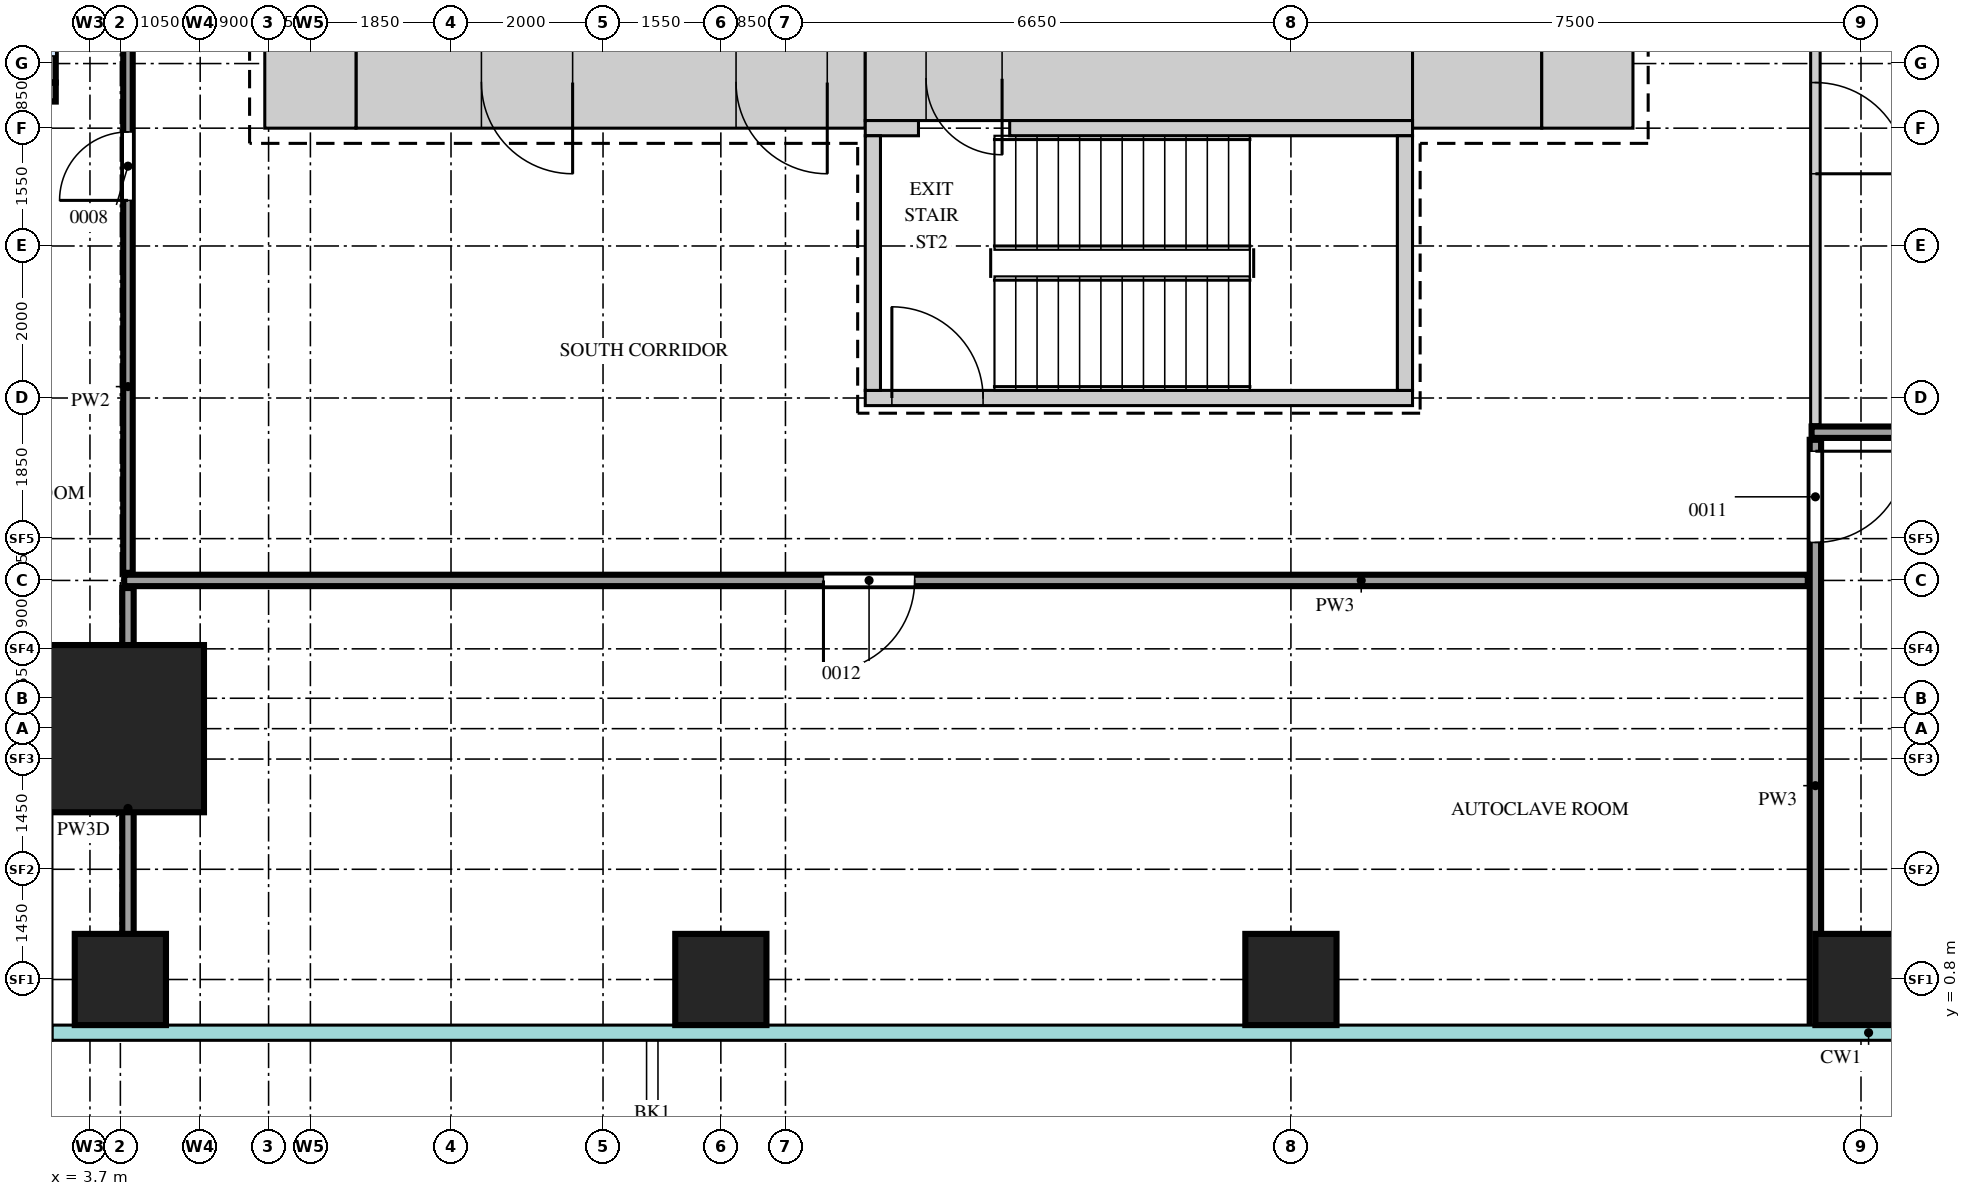
"""IFC4 building model, lengths in metres.
Left out: names, types, materials, properties, quantities, classifications, styles, units other than length and angle.
Written with IfcOpenShell. Run it as: python <this file> out.ifc"""

import sys

from ifc_helpers import new_model, si_unit, direction, frame, frame_2d, origin, origin_2d, place, context, subcontext, project, spatial, rectangle, extrude, source, transform, mapped, element, fill, save


model = new_model("IFC4")
c1 = context("Model", 3, precision=1e-05, world=origin(), true_north=direction((0.0, 1.0)))
c2 = subcontext(c1, "Body", "Model", "MODEL_VIEW")
j1 = project(units=[si_unit("LENGTHUNIT", "METRE"), si_unit("PLANEANGLEUNIT", "RADIAN")], contexts=[c1])
p1 = place(None, origin())
s1 = spatial("IfcSite", under=j1, at=p1, CompositionType="ELEMENT")
p2 = place(p1, origin())
s2 = spatial("IfcBuilding", under=s1, at=p2, CompositionType="ELEMENT")
p3 = place(p2, frame((0.0, 0.0, 55.5)))
s3 = spatial("IfcBuildingStorey", under=s2, at=p3, CompositionType="ELEMENT", Elevation=55.5)
m1 = source(origin(), c2, "Body", "SweptSolid", [
    extrude(rectangle(XDim=6.7, YDim=1.2, at=frame_2d((3.35, 0.0))), origin(), (0.0, 0.0, 1.0), 4.2),
])
p4 = place(p3, frame((7.2, 12.6, 0.0), z_axis=(0.0, 0.0, 1.0), x_axis=(1.0, 0.0, 0.0)))
e1 = element("IfcWall", 1, at=p4, inside=s3, PredefinedType="SHEAR", context=c2, shape_type="MappedRepresentation", body=[
    mapped(m1, transform((0.0, 0.0, 0.0))),
])
m2 = source(origin(), c2, "Body", "SweptSolid", [
    extrude(rectangle(XDim=1.2, YDim=2.1, at=frame_2d((0.6, 1.05))), frame((0.0, 0.61, 0.0), z_axis=(0.0, -1.0, 0.0), x_axis=(1.0, 0.0, 0.0)), (0.0, 0.0, 1.0), 1.22),
])
p5 = place(p4, frame((5.0, 0.0, 0.0)))
e2 = element("IfcOpeningElement", 2, at=p5, cuts=e1, PredefinedType="OPENING", context=c2, shape_type="MappedRepresentation", body=[
    mapped(m2, transform((0.0, 0.0, 0.0))),
])
p6 = place(p4, frame((1.65, 0.0, 0.0)))
e3 = element("IfcOpeningElement", 3, at=p6, cuts=e1, PredefinedType="OPENING", context=c2, shape_type="MappedRepresentation", body=[
    mapped(m2, transform((0.0, 0.0, 0.0))),
])
m3 = source(origin(), c2, "Body", "SweptSolid", [
    extrude(rectangle(XDim=7.2, YDim=1.1, at=frame_2d((3.6, 0.0))), origin(), (0.0, 0.0, 1.0), 4.2),
])
p7 = place(p3, frame((13.9, 12.65, 0.0), z_axis=(0.0, 0.0, 1.0), x_axis=(1.0, 0.0, 0.0)))
e4 = element("IfcWall", 4, at=p7, inside=s3, PredefinedType="SHEAR", context=c2, shape_type="MappedRepresentation", body=[
    mapped(m3, transform((0.0, 0.0, 0.0))),
])
m4 = source(origin(), c2, "Body", "SweptSolid", [
    extrude(rectangle(XDim=1.0, YDim=2.1, at=frame_2d((0.5, 1.05))), frame((0.0, 0.56, 0.0), z_axis=(0.0, -1.0, 0.0), x_axis=(1.0, 0.0, 0.0)), (0.0, 0.0, 1.0), 1.12),
])
p8 = place(p7, frame((0.8, 0.0, 0.0)))
e5 = element("IfcOpeningElement", 5, at=p8, cuts=e4, PredefinedType="OPENING", context=c2, shape_type="MappedRepresentation", body=[
    mapped(m4, transform((0.0, 0.0, 0.0))),
])
m5 = source(origin(), c2, "Body", "SweptSolid", [
    extrude(rectangle(XDim=1.7, YDim=1.2, at=frame_2d((0.85, 0.0))), origin(), (0.0, 0.0, 1.0), 4.2),
])
p9 = place(p3, frame((21.1, 12.6, 0.0), z_axis=(0.0, 0.0, 1.0), x_axis=(1.0, 0.0, 0.0)))
e6 = element("IfcWall", 6, at=p9, inside=s3, PredefinedType="SHEAR", context=c2, shape_type="MappedRepresentation", body=[
    mapped(m5, transform((0.0, 0.0, 0.0))),
])
m6 = source(origin(), c2, "Body", "SweptSolid", [
    extrude(rectangle(XDim=1.2, YDim=1.2, at=frame_2d((0.6, 0.0))), origin(), (0.0, 0.0, 1.0), 4.2),
])
for number, where, z_axis, x_axis in (
    (7, (22.8, 12.6, 0.0), (0.0, 0.0, 1.0), (1.0, 0.0, 0.0)),
    (8, (6.0, 12.6, 0.0), (0.0, 0.0, 1.0), (1.0, 0.0, 0.0)),
):
    element("IfcWall", number, at=place(p3, frame(where, z_axis=z_axis, x_axis=x_axis)), inside=s3, PredefinedType="SHEAR", context=c2, shape_type="MappedRepresentation", body=[
        mapped(m6, transform((0.0, 0.0, 0.0))),
    ])
m7 = source(origin(), c2, "Body", "SweptSolid", [
    extrude(rectangle(XDim=0.7, YDim=0.2, at=frame_2d((0.35, 0.0))), origin(), (0.0, 0.0, 1.0), 4.2),
])
p10 = place(p3, frame((13.9, 12.0, 0.0), z_axis=(0.0, 0.0, 1.0), x_axis=(1.0, 0.0, 0.0)))
e9 = element("IfcWall", 9, at=p10, inside=s3, PredefinedType="SHEAR", context=c2, shape_type="MappedRepresentation", body=[
    mapped(m7, transform((0.0, 0.0, 0.0))),
])
m8 = source(origin(), c2, "Body", "SweptSolid", [
    extrude(rectangle(XDim=5.3, YDim=0.2, at=frame_2d((2.65, 0.0))), origin(), (0.0, 0.0, 1.0), 4.2),
])
p11 = place(p3, frame((15.8, 12.0, 0.0), z_axis=(0.0, 0.0, 1.0), x_axis=(1.0, 0.0, 0.0)))
e10 = element("IfcWall", 10, at=p11, inside=s3, PredefinedType="SHEAR", context=c2, shape_type="MappedRepresentation", body=[
    mapped(m8, transform((0.0, 0.0, 0.0))),
])
m9 = source(origin(), c2, "Body", "SweptSolid", [
    extrude(rectangle(XDim=7.2, YDim=0.2, at=frame_2d((3.6, 0.0))), origin(), (0.0, 0.0, 1.0), 4.2),
])
p12 = place(p3, frame((13.9, 8.45, 0.0), z_axis=(0.0, 0.0, 1.0), x_axis=(1.0, 0.0, 0.0)))
e11 = element("IfcWall", 11, at=p12, inside=s3, PredefinedType="SHEAR", context=c2, shape_type="MappedRepresentation", body=[
    mapped(m9, transform((0.0, 0.0, 0.0))),
])
m10 = source(origin(), c2, "Body", "SweptSolid", [
    extrude(rectangle(XDim=1.2, YDim=2.1, at=frame_2d((0.6, 1.05))), frame((0.0, 0.11, 0.0), z_axis=(0.0, -1.0, 0.0), x_axis=(1.0, 0.0, 0.0)), (0.0, 0.0, 1.0), 0.22),
])
p13 = place(p12, frame((0.35, 0.0, 0.0)))
e12 = element("IfcOpeningElement", 12, at=p13, cuts=e11, PredefinedType="OPENING", context=c2, shape_type="MappedRepresentation", body=[
    mapped(m10, transform((0.0, 0.0, 0.0))),
])
m11 = source(origin(), c2, "Body", "SweptSolid", [
    extrude(rectangle(XDim=3.35, YDim=0.2, at=frame_2d((1.675, 0.0))), origin(), (0.0, 0.0, 1.0), 4.2),
])
for number, where, z_axis, x_axis in (
    (13, (21.0, 8.55, 0.0), (0.0, 0.0, 1.0), (0.0, 1.0, 0.0)),
    (14, (14.0, 8.55, 0.0), (0.0, 0.0, 1.0), (0.0, 1.0, 0.0)),
):
    element("IfcWall", number, at=place(p3, frame(where, z_axis=z_axis, x_axis=x_axis)), inside=s3, PredefinedType="SHEAR", context=c2, shape_type="MappedRepresentation", body=[
        mapped(m11, transform((0.0, 0.0, 0.0))),
    ])
m12 = source(origin(), c2, "Body", "SweptSolid", [
    extrude(rectangle(XDim=2.2, YDim=2.2, at=origin_2d()), origin(), (0.0, 0.0, 1.0), 4.5),
])
p14 = place(p3, frame((4.1, 4.1, 0.0), z_axis=(0.0, 0.0, 1.0), x_axis=(1.0, 0.0, 0.0)))
e15 = element("IfcColumn", 15, at=p14, inside=s3, PredefinedType="COLUMN", context=c2, shape_type="MappedRepresentation", body=[
    mapped(m12, transform((0.0, 0.0, 0.0))),
])
m13 = source(origin(), c2, "Body", "SweptSolid", [
    extrude(rectangle(XDim=1.2, YDim=1.2, at=origin_2d()), origin(), (0.0, 0.0, 1.0), 4.2),
])
for number, where, z_axis, x_axis in (
    (16, (4.1, 0.8, 0.0), (0.0, 0.0, 1.0), (1.0, 0.0, 0.0)),
    (17, (12.0, 0.8, 0.0), (0.0, 0.0, 1.0), (1.0, 0.0, 0.0)),
    (18, (19.5, 0.8, 0.0), (0.0, 0.0, 1.0), (1.0, 0.0, 0.0)),
    (19, (27.0, 0.8, 0.0), (0.0, 0.0, 1.0), (1.0, 0.0, 0.0)),
):
    element("IfcColumn", number, at=place(p3, frame(where, z_axis=z_axis, x_axis=x_axis)), inside=s3, PredefinedType="COLUMN", context=c2, shape_type="MappedRepresentation", body=[
        mapped(m13, transform((0.0, 0.0, 0.0))),
    ])
m14 = source(origin(), c2, "Body", "SweptSolid", [
    extrude(rectangle(XDim=6.3, YDim=0.25, at=frame_2d((3.15, 0.0))), origin(), (0.0, 0.0, 1.0), 4.2),
])
p15 = place(p3, frame((3.125, 12.6, 0.0), z_axis=(0.0, 0.0, 1.0), x_axis=(0.0, 1.0, 0.0)))
e20 = element("IfcWall", 20, at=p15, inside=s3, PredefinedType="SOLIDWALL", context=c2, shape_type="MappedRepresentation", body=[
    mapped(m14, transform((0.0, 0.0, 0.0))),
])
m15 = source(origin(), c2, "Body", "SweptSolid", [
    extrude(rectangle(XDim=1.6, YDim=2.4, at=frame_2d((0.8, 1.2))), frame((0.0, 0.135, 0.0), z_axis=(0.0, -1.0, 0.0), x_axis=(1.0, 0.0, 0.0)), (0.0, 0.0, 1.0), 0.27),
])
p16 = place(p15, frame((0.35, 0.0, 0.0)))
e21 = element("IfcOpeningElement", 21, at=p16, cuts=e20, PredefinedType="OPENING", context=c2, shape_type="MappedRepresentation", body=[
    mapped(m15, transform((0.0, 0.0, 0.0))),
])
p17 = place(p15, frame((4.35, 0.0, 0.0)))
e22 = element("IfcOpeningElement", 22, at=p17, cuts=e20, PredefinedType="OPENING", context=c2, shape_type="MappedRepresentation", body=[
    mapped(m15, transform((0.0, 0.0, 0.0))),
])
m16 = source(origin(), c2, "Body", "SweptSolid", [
    extrude(rectangle(XDim=1.8, YDim=2.4, at=frame_2d((0.9, 1.2))), frame((0.0, 0.135, 0.0), z_axis=(0.0, -1.0, 0.0), x_axis=(1.0, 0.0, 0.0)), (0.0, 0.0, 1.0), 0.27),
])
p18 = place(p15, frame((2.25, 0.0, 0.0)))
e23 = element("IfcOpeningElement", 23, at=p18, cuts=e20, PredefinedType="OPENING", context=c2, shape_type="MappedRepresentation", body=[
    mapped(m16, transform((0.0, 0.0, 0.0))),
])
m17 = source(origin(), c2, "Body", "SweptSolid", [
    extrude(rectangle(XDim=1.85, YDim=0.25, at=frame_2d((0.925, 0.0))), origin(), (0.0, 0.0, 1.0), 4.2),
])
p19 = place(p3, frame((1.4, 12.475, 0.0), z_axis=(0.0, 0.0, 1.0), x_axis=(1.0, 0.0, 0.0)))
e24 = element("IfcWall", 24, at=p19, inside=s3, PredefinedType="SOLIDWALL", context=c2, shape_type="MappedRepresentation", body=[
    mapped(m17, transform((0.0, 0.0, 0.0))),
])
m18 = source(origin(), c2, "Body", "SweptSolid", [
    extrude(rectangle(XDim=5.8, YDim=0.15, at=frame_2d((2.9, 0.0))), origin(), (0.0, 0.0, 1.0), 3.6),
])
p20 = place(p3, frame((4.2, 0.15, 0.0), z_axis=(0.0, 0.0, 1.0), x_axis=(0.0, 1.0, 0.0)))
e25 = element("IfcWall", 25, at=p20, inside=s3, PredefinedType="PARTITIONING", context=c2, shape_type="MappedRepresentation", body=[
    mapped(m18, transform((0.0, 0.0, 0.0))),
])
m19 = source(origin(), c2, "Body", "SweptSolid", [
    extrude(rectangle(XDim=7.75, YDim=0.15, at=frame_2d((3.875, 0.0))), origin(), (0.0, 0.0, 1.0), 4.3),
])
p21 = place(p3, frame((26.4, 0.15, 0.0), z_axis=(0.0, 0.0, 1.0), x_axis=(0.0, 1.0, 0.0)))
e26 = element("IfcWall", 26, at=p21, inside=s3, PredefinedType="PARTITIONING", context=c2, shape_type="MappedRepresentation", body=[
    mapped(m19, transform((0.0, 0.0, 0.0))),
])
m20 = source(origin(), c2, "Body", "SweptSolid", [
    extrude(rectangle(XDim=1.2, YDim=2.1, at=frame_2d((0.6, 1.05))), frame((0.0, 0.085, 0.0), z_axis=(0.0, -1.0, 0.0), x_axis=(1.0, 0.0, 0.0)), (0.0, 0.0, 1.0), 0.17),
])
p22 = place(p21, frame((6.4, 0.0, 0.0)))
e27 = element("IfcOpeningElement", 27, at=p22, cuts=e26, PredefinedType="OPENING", context=c2, shape_type="MappedRepresentation", body=[
    mapped(m20, transform((0.0, 0.0, 0.0))),
])
m21 = source(origin(), c2, "Body", "SweptSolid", [
    extrude(rectangle(XDim=22.15, YDim=0.15, at=frame_2d((11.075, 0.0))), origin(), (0.0, 0.0, 1.0), 4.3),
])
p23 = place(p3, frame((4.15, 6.05, 0.0), z_axis=(0.0, 0.0, 1.0), x_axis=(1.0, 0.0, 0.0)))
e28 = element("IfcWall", 28, at=p23, inside=s3, PredefinedType="PARTITIONING", context=c2, shape_type="MappedRepresentation", body=[
    mapped(m21, transform((0.0, 0.0, 0.0))),
])
p24 = place(p23, frame((9.2, 0.0, 0.0)))
e29 = element("IfcOpeningElement", 29, at=p24, cuts=e28, PredefinedType="OPENING", context=c2, shape_type="MappedRepresentation", body=[
    mapped(m20, transform((0.0, 0.0, 0.0))),
])
m22 = source(origin(), c2, "Body", "SweptSolid", [
    extrude(rectangle(XDim=27.5, YDim=0.15, at=frame_2d((13.75, 0.0))), origin(), (0.0, 0.0, 1.0), 4.3),
])
p25 = place(p3, frame((26.35, 8.0, 0.0), z_axis=(0.0, 0.0, 1.0), x_axis=(1.0, 0.0, 0.0)))
e30 = element("IfcWall", 30, at=p25, inside=s3, PredefinedType="PARTITIONING", context=c2, shape_type="MappedRepresentation", body=[
    mapped(m22, transform((0.0, 0.0, 0.0))),
])
m23 = source(origin(), c2, "Body", "SweptSolid", [
    extrude(rectangle(XDim=27.1, YDim=0.125, at=frame_2d((13.55, 0.0))), origin(), (0.0, 0.0, 1.0), 4.3),
])
p26 = place(p3, frame((26.4, 8.1, 0.0), z_axis=(0.0, 0.0, 1.0), x_axis=(0.0, 1.0, 0.0)))
e31 = element("IfcWall", 31, at=p26, inside=s3, PredefinedType="PARTITIONING", context=c2, shape_type="MappedRepresentation", body=[
    mapped(m23, transform((0.0, 0.0, 0.0))),
])
m24 = source(origin(), c2, "Body", "SweptSolid", [
    extrude(rectangle(XDim=1.2, YDim=2.1, at=frame_2d((0.6, 1.05))), frame((0.0, 0.073, 0.0), z_axis=(0.0, -1.0, 0.0), x_axis=(1.0, 0.0, 0.0)), (0.0, 0.0, 1.0), 0.145),
])
p27 = place(p26, frame((3.3, 0.0, 0.0)))
e32 = element("IfcOpeningElement", 32, at=p27, cuts=e31, PredefinedType="OPENING", context=c2, shape_type="MappedRepresentation", body=[
    mapped(m24, transform((0.0, 0.0, 0.0))),
])
p28 = place(p26, frame((11.3, 0.0, 0.0)))
e33 = element("IfcOpeningElement", 33, at=p28, cuts=e31, PredefinedType="OPENING", context=c2, shape_type="MappedRepresentation", body=[
    mapped(m24, transform((0.0, 0.0, 0.0))),
])
m25 = source(origin(), c2, "Body", "SweptSolid", [
    extrude(rectangle(XDim=8.6, YDim=0.125, at=frame_2d((4.3, 0.0))), origin(), (0.0, 0.0, 1.0), 4.3),
])
p29 = place(p3, frame((4.2, 6.15, 0.0), z_axis=(0.0, 0.0, 1.0), x_axis=(0.0, 1.0, 0.0)))
e34 = element("IfcWall", 34, at=p29, inside=s3, PredefinedType="PARTITIONING", context=c2, shape_type="MappedRepresentation", body=[
    mapped(m25, transform((0.0, 0.0, 0.0))),
])
m26 = source(origin(), c2, "Body", "SweptSolid", [
    extrude(rectangle(XDim=0.9, YDim=2.1, at=frame_2d((0.45, 1.05))), frame((0.0, 0.073, 0.0), z_axis=(0.0, -1.0, 0.0), x_axis=(1.0, 0.0, 0.0)), (0.0, 0.0, 1.0), 0.145),
])
p30 = place(p29, frame((4.9, 0.0, 0.0)))
e35 = element("IfcOpeningElement", 35, at=p30, cuts=e34, PredefinedType="OPENING", context=c2, shape_type="MappedRepresentation", body=[
    mapped(m26, transform((0.0, 0.0, 0.0))),
])
m27 = source(origin(), c2, "Body", "SweptSolid", [
    extrude(rectangle(XDim=1.2, YDim=2.1, at=frame_2d((0.6, 1.05))), frame((0.0, 0.55, 0.0), z_axis=(0.0, -1.0, 0.0), x_axis=(1.0, 0.0, 0.0)), (0.0, 0.0, 1.0), 1.1),
])
p31 = place(p5, origin())
e36 = element("IfcDoor", 36, at=p31, inside=s3, OperationType="SINGLE_SWING_RIGHT", PredefinedType="DOOR", context=c2, shape_type="MappedRepresentation", body=[
    mapped(m27, transform((0.0, 0.0, 0.0))),
])
fill(e2, e36)
p32 = place(p6, origin())
e37 = element("IfcDoor", 37, at=p32, inside=s3, OperationType="SINGLE_SWING_RIGHT", PredefinedType="DOOR", context=c2, shape_type="MappedRepresentation", body=[
    mapped(m27, transform((0.0, 0.0, 0.0))),
])
fill(e3, e37)
m28 = source(origin(), c2, "Body", "SweptSolid", [
    extrude(rectangle(XDim=1.0, YDim=2.1, at=frame_2d((0.5, 1.05))), frame((0.0, 0.5, 0.0), z_axis=(0.0, -1.0, 0.0), x_axis=(1.0, 0.0, 0.0)), (0.0, 0.0, 1.0), 1.0),
])
p33 = place(p8, origin())
e38 = element("IfcDoor", 38, at=p33, inside=s3, OperationType="SINGLE_SWING_RIGHT", PredefinedType="DOOR", context=c2, shape_type="MappedRepresentation", body=[
    mapped(m28, transform((0.0, 0.0, 0.0))),
])
fill(e5, e38)
m29 = source(origin(), c2, "Body", "SweptSolid", [
    extrude(rectangle(XDim=1.2, YDim=2.1, at=frame_2d((0.6, 1.05))), frame((0.0, 0.025, 0.0), z_axis=(0.0, -1.0, 0.0), x_axis=(1.0, 0.0, 0.0)), (0.0, 0.0, 1.0), 0.05),
])
p34 = place(p22, origin())
e39 = element("IfcDoor", 39, at=p34, inside=s3, OperationType="SINGLE_SWING_RIGHT", PredefinedType="DOOR", context=c2, shape_type="MappedRepresentation", body=[
    mapped(m29, transform((0.0, 0.0, 0.0))),
])
fill(e27, e39)
p35 = place(p27, origin())
e40 = element("IfcDoor", 40, at=p35, inside=s3, OperationType="SINGLE_SWING_LEFT", PredefinedType="DOOR", context=c2, shape_type="MappedRepresentation", body=[
    mapped(m29, transform((0.0, 0.0, 0.0))),
])
fill(e32, e40)
m30 = source(origin(), c2, "Body", "SweptSolid", [
    extrude(rectangle(XDim=0.9, YDim=2.1, at=frame_2d((0.45, 1.05))), frame((0.0, 0.025, 0.0), z_axis=(0.0, -1.0, 0.0), x_axis=(1.0, 0.0, 0.0)), (0.0, 0.0, 1.0), 0.05),
])
p36 = place(p30, origin())
e41 = element("IfcDoor", 41, at=p36, inside=s3, OperationType="SINGLE_SWING_RIGHT", PredefinedType="DOOR", context=c2, shape_type="MappedRepresentation", body=[
    mapped(m30, transform((0.0, 0.0, 0.0))),
])
fill(e35, e41)
p37 = place(p24, origin())
e42 = element("IfcDoor", 42, at=p37, inside=s3, OperationType="SINGLE_SWING_LEFT", PredefinedType="DOOR", context=c2, shape_type="MappedRepresentation", body=[
    mapped(m29, transform((0.0, 0.0, 0.0))),
])
fill(e29, e42)
p38 = place(p13, origin())
e43 = element("IfcDoor", 43, at=p38, inside=s3, OperationType="SINGLE_SWING_RIGHT", PredefinedType="DOOR", context=c2, shape_type="MappedRepresentation", body=[
    mapped(m29, transform((0.0, 0.0, 0.0))),
])
fill(e12, e43)
save(model, sys.argv[1])
